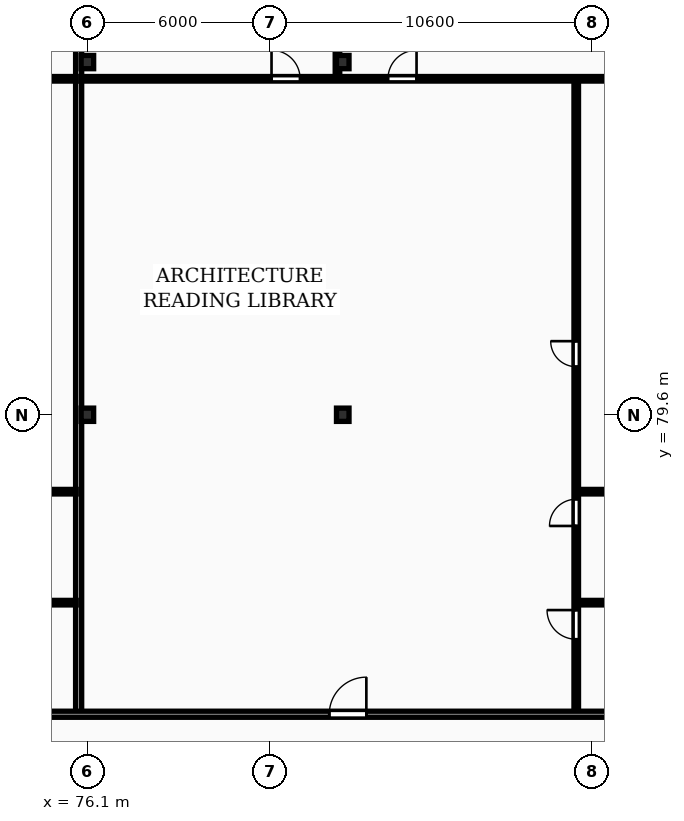
"""IFC4 building model, lengths in metres.
Left out: names, types, materials, properties, quantities, classifications, styles, units other than length and angle.
Written with IfcOpenShell. Run it as: python <this file> out.ifc"""

import sys

from ifc_helpers import new_model, si_unit, direction, frame, frame_2d, origin, origin_2d, place, context, subcontext, project, spatial, rectangle, i_section, extrude, element, fill, save


model = new_model("IFC4")
c1 = context("Model", 3, precision=1e-05, world=origin(), true_north=direction((0.0, 1.0)))
c2 = subcontext(c1, "Body", "Model", "MODEL_VIEW")
j1 = project(units=[si_unit("LENGTHUNIT", "METRE"), si_unit("PLANEANGLEUNIT", "RADIAN")], contexts=[c1])
p1 = place(None, origin())
s1 = spatial("IfcSite", under=j1, at=p1, CompositionType="ELEMENT")
p2 = place(p1, origin())
s2 = spatial("IfcBuilding", under=s1, at=p2, CompositionType="ELEMENT")
p3 = place(p2, frame((0.0, 0.0, 153.7)))
s3 = spatial("IfcBuildingStorey", under=s2, at=p3, CompositionType="ELEMENT", Elevation=153.7)
for number, where, z_axis, x_axis in (
    (1, (76.1, 79.6, 0.0), (0.0, 0.0, 1.0), (1.0, 0.0, 0.0)),
    (2, (76.1, 91.2, 0.0), (0.0, 0.0, 1.0), (1.0, 0.0, 0.0)),
    (3, (84.5, 79.6, 0.0), (0.0, 0.0, 1.0), (1.0, 0.0, 0.0)),
    (4, (84.5, 91.2, 0.0), (0.0, 0.0, 1.0), (1.0, 0.0, 0.0)),
):
    element("IfcColumn", number, at=place(p3, frame(where, z_axis=z_axis, x_axis=x_axis)), inside=s3, PredefinedType="COLUMN", context=c2, shape_type="SweptSolid", body=[
        extrude(i_section(OverallWidth=0.412, OverallDepth=0.437, WebThickness=0.036, FlangeThickness=0.052, FilletRadius=0.015, at=origin_2d()), origin(), (0.0, 0.0, 1.0), 3.6),
    ])
p4 = place(p3, frame((75.812, 69.83, 0.0), z_axis=(0.0, 0.0, 1.0), x_axis=(0.0, 1.0, 0.0)))
e5 = element("IfcWall", 5, at=p4, inside=s3, PredefinedType="PARTITIONING", context=c2, shape_type="SweptSolid", body=[
    extrude(rectangle(XDim=26.07, YDim=0.2, at=frame_2d((13.035, 0.0))), origin(), (0.0, 0.0, 1.0), 2.627),
])
for number, where, z_axis, x_axis in (
    (6, (72.373, 73.42, 0.0), (0.0, 0.0, 1.0), (1.0, 0.0, 0.0)),
    (7, (72.373, 77.07, 0.0), (0.0, 0.0, 1.0), (1.0, 0.0, 0.0)),
):
    element("IfcWall", number, at=place(p3, frame(where, z_axis=z_axis, x_axis=x_axis)), inside=s3, PredefinedType="PARTITIONING", context=c2, shape_type="SweptSolid", body=[
        extrude(rectangle(XDim=3.36, YDim=0.15, at=frame_2d((1.68, 0.0))), origin(), (0.0, 0.0, 1.0), 3.32),
    ])
p5 = place(p3, frame((57.68, 90.65, 0.0), z_axis=(0.0, 0.0, 1.0), x_axis=(1.0, 0.0, 0.0)))
e8 = element("IfcWall", 8, at=p5, inside=s3, PredefinedType="PARTITIONING", context=c2, shape_type="SweptSolid", body=[
    extrude(rectangle(XDim=18.052, YDim=0.15, at=frame_2d((9.026, 0.0))), origin(), (0.0, 0.0, 1.0), 3.32),
])
p6 = place(p5, frame((6.416, 0.0, 0.0)))
e9 = element("IfcOpeningElement", 9, at=p6, cuts=e8, PredefinedType="OPENING", context=c2, shape_type="SweptSolid", body=[
    extrude(rectangle(XDim=0.94, YDim=2.1, at=frame_2d((0.47, 1.05))), frame((0.0, 0.085, 0.0), z_axis=(0.0, -1.0, 0.0), x_axis=(1.0, 0.0, 0.0)), (0.0, 0.0, 1.0), 0.17),
])
p7 = place(p5, frame((7.968, 0.0, 0.0)))
e10 = element("IfcOpeningElement", 10, at=p7, cuts=e8, PredefinedType="OPENING", context=c2, shape_type="SweptSolid", body=[
    extrude(rectangle(XDim=0.94, YDim=2.1, at=frame_2d((0.47, 1.05))), frame((0.0, 0.085, 0.0), z_axis=(0.0, -1.0, 0.0), x_axis=(1.0, 0.0, 0.0)), (0.0, 0.0, 1.0), 0.17),
])
for number, where, z_axis, x_axis in (
    (11, (92.24, 73.42, 0.0), (0.0, 0.0, 1.0), (1.0, 0.0, 0.0)),
    (12, (92.24, 77.07, 0.0), (0.0, 0.0, 1.0), (1.0, 0.0, 0.0)),
):
    element("IfcWall", number, at=place(p3, frame(where, z_axis=z_axis, x_axis=x_axis)), inside=s3, PredefinedType="PARTITIONING", context=c2, shape_type="SweptSolid", body=[
        extrude(rectangle(XDim=3.13, YDim=0.15, at=frame_2d((1.565, 0.0))), origin(), (0.0, 0.0, 1.0), 3.32),
    ])
p8 = place(p3, frame((92.18, 69.81, 0.0), z_axis=(0.0, 0.0, 1.0), x_axis=(0.0, 1.0, 0.0)))
e13 = element("IfcWall", 13, at=p8, inside=s3, PredefinedType="PARTITIONING", context=c2, shape_type="SweptSolid", body=[
    extrude(rectangle(XDim=20.78, YDim=0.15, at=frame_2d((10.39, 0.0))), origin(), (0.0, 0.0, 1.0), 3.32),
])
p9 = place(p8, frame((2.406, 0.0, 0.0)))
e14 = element("IfcOpeningElement", 14, at=p9, cuts=e13, PredefinedType="OPENING", context=c2, shape_type="SweptSolid", body=[
    extrude(rectangle(XDim=0.96, YDim=2.1, at=frame_2d((0.48, 1.05))), frame((0.0, 0.085, 0.0), z_axis=(0.0, -1.0, 0.0), x_axis=(1.0, 0.0, 0.0)), (0.0, 0.0, 1.0), 0.17),
])
p10 = place(p8, frame((6.133, 0.0, 0.0)))
e15 = element("IfcOpeningElement", 15, at=p10, cuts=e13, PredefinedType="OPENING", context=c2, shape_type="SweptSolid", body=[
    extrude(rectangle(XDim=0.88, YDim=2.06, at=frame_2d((0.44, 1.03))), frame((0.0, 0.085, 0.0), z_axis=(0.0, -1.0, 0.0), x_axis=(1.0, 0.0, 0.0)), (0.0, 0.0, 1.0), 0.17),
])
p11 = place(p8, frame((11.37, 0.0, 0.0)))
e16 = element("IfcOpeningElement", 16, at=p11, cuts=e13, PredefinedType="OPENING", context=c2, shape_type="SweptSolid", body=[
    extrude(rectangle(XDim=0.84, YDim=2.04, at=frame_2d((0.42, 1.02))), frame((0.0, 0.085, 0.0), z_axis=(0.0, -1.0, 0.0), x_axis=(1.0, 0.0, 0.0)), (0.0, 0.0, 1.0), 0.17),
])
p12 = place(p3, frame((84.326, 90.73, 0.0), z_axis=(0.0, 0.0, 1.0), x_axis=(0.0, 1.0, 0.0)))
e17 = element("IfcWall", 17, at=p12, inside=s3, PredefinedType="PARTITIONING", context=c2, shape_type="SweptSolid", body=[
    extrude(rectangle(XDim=5.17, YDim=0.15, at=frame_2d((2.585, 0.0))), origin(), (0.0, 0.0, 1.0), 2.627),
])
p13 = place(p3, frame((75.893, 90.65, 0.0), z_axis=(0.0, 0.0, 1.0), x_axis=(1.0, 0.0, 0.0)))
e18 = element("IfcWall", 18, at=p13, inside=s3, PredefinedType="PARTITIONING", context=c2, shape_type="SweptSolid", body=[
    extrude(rectangle(XDim=19.478, YDim=0.15, at=frame_2d((9.739, 0.0))), origin(), (0.0, 0.0, 1.0), 3.32),
])
p14 = place(p13, frame((6.265, 0.0, 0.0)))
e19 = element("IfcOpeningElement", 19, at=p14, cuts=e18, PredefinedType="OPENING", context=c2, shape_type="SweptSolid", body=[
    extrude(rectangle(XDim=0.94, YDim=2.1, at=frame_2d((0.47, 1.05))), frame((0.0, 0.085, 0.0), z_axis=(0.0, -1.0, 0.0), x_axis=(1.0, 0.0, 0.0)), (0.0, 0.0, 1.0), 0.17),
])
p15 = place(p13, frame((10.095, 0.0, 0.0)))
e20 = element("IfcOpeningElement", 20, at=p15, cuts=e18, PredefinedType="OPENING", context=c2, shape_type="SweptSolid", body=[
    extrude(rectangle(XDim=0.94, YDim=2.1, at=frame_2d((0.47, 1.05))), frame((0.0, 0.085, 0.0), z_axis=(0.0, -1.0, 0.0), x_axis=(1.0, 0.0, 0.0)), (0.0, 0.0, 1.0), 0.17),
])
p16 = place(p3, frame((57.6, 69.75, 0.0), z_axis=(0.0, 0.0, 1.0), x_axis=(1.0, 0.0, 0.0)))
e21 = element("IfcWall", 21, at=p16, inside=s3, PredefinedType="PARTITIONING", context=c2, shape_type="SweptSolid", body=[
    extrude(rectangle(XDim=73.0, YDim=0.2, at=frame_2d((36.5, 0.0))), origin(), (0.0, 0.0, 1.0), 3.32),
])
p17 = place(p16, frame((7.416, 0.0, 0.0)))
e22 = element("IfcOpeningElement", 22, at=p17, cuts=e21, PredefinedType="OPENING", context=c2, shape_type="SweptSolid", body=[
    extrude(rectangle(XDim=1.22, YDim=2.18, at=frame_2d((0.61, 1.09))), frame((0.0, 0.11, 0.0), z_axis=(0.0, -1.0, 0.0), x_axis=(1.0, 0.0, 0.0)), (0.0, 0.0, 1.0), 0.22),
])
p18 = place(p16, frame((26.456, 0.0, 0.0)))
e23 = element("IfcOpeningElement", 23, at=p18, cuts=e21, PredefinedType="OPENING", context=c2, shape_type="SweptSolid", body=[
    extrude(rectangle(XDim=1.22, YDim=2.18, at=frame_2d((0.61, 1.09))), frame((0.0, 0.11, 0.0), z_axis=(0.0, -1.0, 0.0), x_axis=(1.0, 0.0, 0.0)), (0.0, 0.0, 1.0), 0.22),
])
p19 = place(p16, frame((44.81, 0.0, 0.0)))
e24 = element("IfcOpeningElement", 24, at=p19, cuts=e21, PredefinedType="OPENING", context=c2, shape_type="SweptSolid", body=[
    extrude(rectangle(XDim=1.22, YDim=2.18, at=frame_2d((0.61, 1.09))), frame((0.0, 0.11, 0.0), z_axis=(0.0, -1.0, 0.0), x_axis=(1.0, 0.0, 0.0)), (0.0, 0.0, 1.0), 0.22),
])
p20 = place(p16, frame((57.195, 0.0, 0.0)))
e25 = element("IfcOpeningElement", 25, at=p20, cuts=e21, PredefinedType="OPENING", context=c2, shape_type="SweptSolid", body=[
    extrude(rectangle(XDim=0.95, YDim=2.15, at=frame_2d((0.475, 1.075))), frame((0.0, 0.11, 0.0), z_axis=(0.0, -1.0, 0.0), x_axis=(1.0, 0.0, 0.0)), (0.0, 0.0, 1.0), 0.22),
])
p21 = place(p9, origin())
e26 = element("IfcDoor", 26, at=p21, inside=s3, OperationType="SINGLE_SWING_RIGHT", PredefinedType="DOOR", context=c2, shape_type="SweptSolid", body=[
    extrude(rectangle(XDim=0.96, YDim=2.1, at=frame_2d((0.48, 1.05))), frame((0.0, 0.025, 0.0), z_axis=(0.0, -1.0, 0.0), x_axis=(1.0, 0.0, 0.0)), (0.0, 0.0, 1.0), 0.05),
])
fill(e14, e26)
p22 = place(p10, origin())
e27 = element("IfcDoor", 27, at=p22, inside=s3, OperationType="SINGLE_SWING_LEFT", PredefinedType="DOOR", context=c2, shape_type="SweptSolid", body=[
    extrude(rectangle(XDim=0.88, YDim=2.06, at=frame_2d((0.44, 1.03))), frame((0.0, 0.025, 0.0), z_axis=(0.0, -1.0, 0.0), x_axis=(1.0, 0.0, 0.0)), (0.0, 0.0, 1.0), 0.05),
])
fill(e15, e27)
p23 = place(p11, origin())
e28 = element("IfcDoor", 28, at=p23, inside=s3, OperationType="SINGLE_SWING_RIGHT", PredefinedType="DOOR", context=c2, shape_type="SweptSolid", body=[
    extrude(rectangle(XDim=0.84, YDim=2.04, at=frame_2d((0.42, 1.02))), frame((0.0, 0.025, 0.0), z_axis=(0.0, -1.0, 0.0), x_axis=(1.0, 0.0, 0.0)), (0.0, 0.0, 1.0), 0.05),
])
fill(e16, e28)
p24 = place(p14, origin())
e29 = element("IfcDoor", 29, at=p24, inside=s3, OperationType="SINGLE_SWING_LEFT", PredefinedType="DOOR", context=c2, shape_type="SweptSolid", body=[
    extrude(rectangle(XDim=0.94, YDim=2.1, at=frame_2d((0.47, 1.05))), frame((0.0, 0.025, 0.0), z_axis=(0.0, -1.0, 0.0), x_axis=(1.0, 0.0, 0.0)), (0.0, 0.0, 1.0), 0.05),
])
fill(e19, e29)
p25 = place(p15, origin())
e30 = element("IfcDoor", 30, at=p25, inside=s3, OperationType="SINGLE_SWING_RIGHT", PredefinedType="DOOR", context=c2, shape_type="SweptSolid", body=[
    extrude(rectangle(XDim=0.94, YDim=2.1, at=frame_2d((0.47, 1.05))), frame((0.0, 0.025, 0.0), z_axis=(0.0, -1.0, 0.0), x_axis=(1.0, 0.0, 0.0)), (0.0, 0.0, 1.0), 0.05),
])
fill(e20, e30)
p26 = place(p18, origin())
e31 = element("IfcDoor", 31, at=p26, inside=s3, OperationType="SINGLE_SWING_RIGHT", PredefinedType="DOOR", context=c2, shape_type="SweptSolid", body=[
    extrude(rectangle(XDim=1.22, YDim=2.18, at=frame_2d((0.61, 1.09))), frame((0.0, 0.025, 0.0), z_axis=(0.0, -1.0, 0.0), x_axis=(1.0, 0.0, 0.0)), (0.0, 0.0, 1.0), 0.05),
])
fill(e23, e31)
save(model, sys.argv[1])
